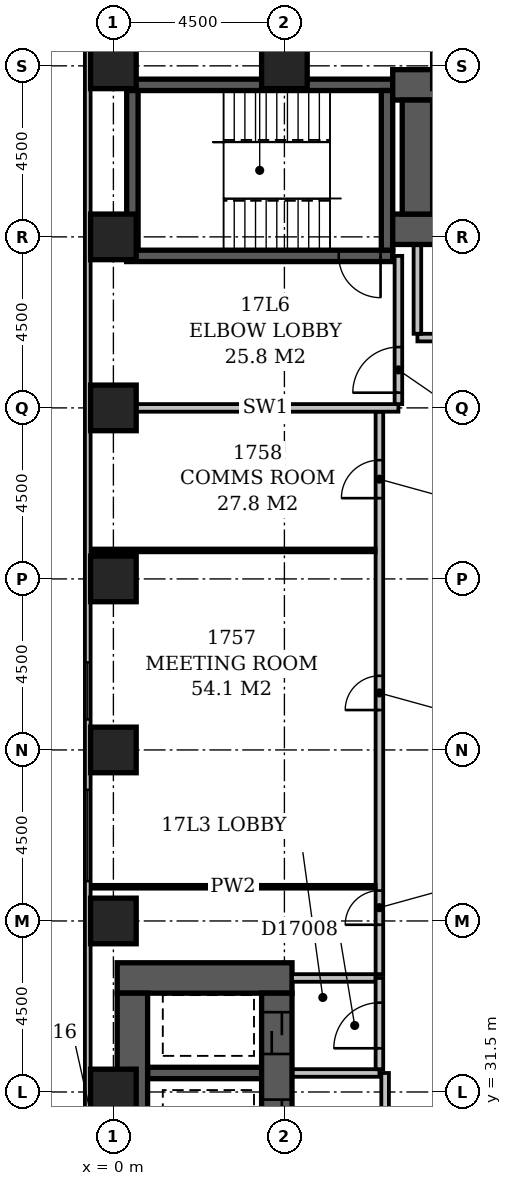
"""IFC4 building model, lengths in metres.
Left out: names, types, materials, properties, quantities, classifications, styles, units other than length and angle.
Written with IfcOpenShell. Run it as: python <this file> out.ifc"""

import sys

from ifc_helpers import new_model, si_unit, direction, frame, frame_2d, origin, origin_2d, place, context, subcontext, project, spatial, rectangle, extrude, element, fill, save


model = new_model("IFC4")
c1 = context("Model", 3, precision=1e-05, world=origin(), true_north=direction((0.0, 1.0)))
c2 = subcontext(c1, "Body", "Model", "MODEL_VIEW")
j1 = project(units=[si_unit("LENGTHUNIT", "METRE"), si_unit("PLANEANGLEUNIT", "RADIAN")], contexts=[c1])
p1 = place(None, origin())
s1 = spatial("IfcSite", under=j1, at=p1, CompositionType="ELEMENT")
p2 = place(p1, origin())
s2 = spatial("IfcBuilding", under=s1, at=p2, CompositionType="ELEMENT")
p3 = place(p2, frame((0.0, 0.0, 72.2)))
s3 = spatial("IfcBuildingStorey", under=s2, at=p3, CompositionType="ELEMENT", Elevation=72.2)
p4 = place(p3, frame((0.1, 34.5, -0.3), z_axis=(0.0, 0.0, 1.0), x_axis=(1.0, 0.0, 0.0)))
e1 = element("IfcWall", 1, at=p4, inside=s3, PredefinedType="SHEAR", context=c2, shape_type="SweptSolid", body=[
    extrude(rectangle(XDim=4.6, YDim=0.8, at=frame_2d((2.3, 0.0))), origin(), (0.0, 0.0, 1.0), 3.6),
])
p5 = place(p3, frame((0.35, 53.5, -0.3), z_axis=(0.0, 0.0, 1.0), x_axis=(1.0, 0.0, 0.0)))
e2 = element("IfcWall", 2, at=p5, inside=s3, PredefinedType="SHEAR", context=c2, shape_type="SweptSolid", body=[
    extrude(rectangle(XDim=7.0, YDim=0.3, at=frame_2d((3.5, 0.0))), origin(), (0.0, 0.0, 1.0), 3.6),
])
p6 = place(p5, frame((5.58, 0.0, 0.3)))
e3 = element("IfcOpeningElement", 3, at=p6, cuts=e2, PredefinedType="OPENING", context=c2, shape_type="SweptSolid", body=[
    extrude(rectangle(XDim=1.1, YDim=2.1, at=frame_2d((0.55, 1.05))), frame((0.0, 0.162, 0.0), z_axis=(0.0, -1.0, 0.0), x_axis=(1.0, 0.0, 0.0)), (0.0, 0.0, 1.0), 0.324),
])
p7 = place(p3, frame((0.35, 58.0, -0.3), z_axis=(0.0, 0.0, 1.0), x_axis=(1.0, 0.0, 0.0)))
e4 = element("IfcWall", 4, at=p7, inside=s3, PredefinedType="SHEAR", context=c2, shape_type="SweptSolid", body=[
    extrude(rectangle(XDim=7.0, YDim=0.3, at=frame_2d((3.5, 0.0))), origin(), (0.0, 0.0, 1.0), 3.6),
])
p8 = place(p3, frame((0.5, 27.15, -0.3), z_axis=(0.0, 0.0, 1.0), x_axis=(0.0, 1.0, 0.0)))
e5 = element("IfcWall", 5, at=p8, inside=s3, PredefinedType="SHEAR", context=c2, shape_type="SweptSolid", body=[
    extrude(rectangle(XDim=6.95, YDim=0.8, at=frame_2d((3.475, 0.0))), origin(), (0.0, 0.0, 1.0), 3.6),
])
p9 = place(p3, frame((0.5, 53.65, -0.3), z_axis=(0.0, 0.0, 1.0), x_axis=(0.0, 1.0, 0.0)))
e6 = element("IfcWall", 6, at=p9, inside=s3, PredefinedType="SHEAR", context=c2, shape_type="SweptSolid", body=[
    extrude(rectangle(XDim=4.2, YDim=0.3, at=frame_2d((2.1, 0.0))), origin(), (0.0, 0.0, 1.0), 3.6),
])
p10 = place(p3, frame((0.9, 32.0, -0.3), z_axis=(0.0, 0.0, 1.0), x_axis=(1.0, 0.0, 0.0)))
e7 = element("IfcWall", 7, at=p10, inside=s3, PredefinedType="SHEAR", context=c2, shape_type="SweptSolid", body=[
    extrude(rectangle(XDim=3.0, YDim=0.3, at=frame_2d((1.5, 0.0))), origin(), (0.0, 0.0, 1.0), 3.6),
])
p11 = place(p3, frame((4.3, 27.15, -0.3), z_axis=(0.0, 0.0, 1.0), x_axis=(0.0, 1.0, 0.0)))
e8 = element("IfcWall", 8, at=p11, inside=s3, PredefinedType="SHEAR", context=c2, shape_type="SweptSolid", body=[
    extrude(rectangle(XDim=6.95, YDim=0.8, at=frame_2d((3.475, 0.0))), origin(), (0.0, 0.0, 1.0), 3.6),
])
p12 = place(p11, frame((3.05, 0.0, 0.3)))
e9 = element("IfcOpeningElement", 9, at=p12, cuts=e8, PredefinedType="OPENING", context=c2, shape_type="SweptSolid", body=[
    extrude(rectangle(XDim=1.1, YDim=2.1, at=frame_2d((0.55, 1.05))), frame((0.0, 0.412, 0.0), z_axis=(0.0, -1.0, 0.0), x_axis=(1.0, 0.0, 0.0)), (0.0, 0.0, 1.0), 0.824),
])
p13 = place(p11, frame((0.55, 0.0, 0.3)))
e10 = element("IfcOpeningElement", 10, at=p13, cuts=e8, PredefinedType="OPENING", context=c2, shape_type="SweptSolid", body=[
    extrude(rectangle(XDim=1.1, YDim=2.1, at=frame_2d((0.55, 1.05))), frame((0.0, 0.412, 0.0), z_axis=(0.0, -1.0, 0.0), x_axis=(1.0, 0.0, 0.0)), (0.0, 0.0, 1.0), 0.824),
])
p14 = place(p11, frame((5.35, 0.0, 0.3)))
e11 = element("IfcOpeningElement", 11, at=p14, cuts=e8, PredefinedType="OPENING", context=c2, shape_type="SweptSolid", body=[
    extrude(rectangle(XDim=1.1, YDim=2.1, at=frame_2d((0.55, 1.05))), frame((0.0, 0.412, 0.0), z_axis=(0.0, -1.0, 0.0), x_axis=(1.0, 0.0, 0.0)), (0.0, 0.0, 1.0), 0.824),
])
p15 = place(p3, frame((7.2, 53.65, -0.3), z_axis=(0.0, 0.0, 1.0), x_axis=(0.0, 1.0, 0.0)))
e12 = element("IfcWall", 12, at=p15, inside=s3, PredefinedType="SHEAR", context=c2, shape_type="SweptSolid", body=[
    extrude(rectangle(XDim=4.2, YDim=0.3, at=frame_2d((2.1, 0.0))), origin(), (0.0, 0.0, 1.0), 3.6),
])
p16 = place(p3, frame((7.35, 54.2, -0.3), z_axis=(0.0, 0.0, 1.0), x_axis=(1.0, 0.0, 0.0)))
e13 = element("IfcWall", 13, at=p16, inside=s3, PredefinedType="SHEAR", context=c2, shape_type="SweptSolid", body=[
    extrude(rectangle(XDim=16.45, YDim=0.8, at=frame_2d((8.225, 0.0))), origin(), (0.0, 0.0, 1.0), 3.6),
])
p17 = place(p16, frame((1.35, 0.0, 0.3)))
e14 = element("IfcOpeningElement", 14, at=p17, cuts=e13, PredefinedType="OPENING", context=c2, shape_type="SweptSolid", body=[
    extrude(rectangle(XDim=1.1, YDim=2.1, at=frame_2d((0.55, 1.05))), frame((0.0, 0.412, 0.0), z_axis=(0.0, -1.0, 0.0), x_axis=(1.0, 0.0, 0.0)), (0.0, 0.0, 1.0), 0.824),
])
p18 = place(p16, frame((3.85, 0.0, 0.3)))
e15 = element("IfcOpeningElement", 15, at=p18, cuts=e13, PredefinedType="OPENING", context=c2, shape_type="SweptSolid", body=[
    extrude(rectangle(XDim=1.1, YDim=2.1, at=frame_2d((0.55, 1.05))), frame((0.0, 0.412, 0.0), z_axis=(0.0, -1.0, 0.0), x_axis=(1.0, 0.0, 0.0)), (0.0, 0.0, 1.0), 0.824),
])
p19 = place(p16, frame((6.35, 0.0, 0.3)))
e16 = element("IfcOpeningElement", 16, at=p19, cuts=e13, PredefinedType="OPENING", context=c2, shape_type="SweptSolid", body=[
    extrude(rectangle(XDim=1.1, YDim=2.1, at=frame_2d((0.55, 1.05))), frame((0.0, 0.412, 0.0), z_axis=(0.0, -1.0, 0.0), x_axis=(1.0, 0.0, 0.0)), (0.0, 0.0, 1.0), 0.824),
])
p20 = place(p16, frame((8.85, 0.0, 0.3)))
e17 = element("IfcOpeningElement", 17, at=p20, cuts=e13, PredefinedType="OPENING", context=c2, shape_type="SweptSolid", body=[
    extrude(rectangle(XDim=1.1, YDim=2.1, at=frame_2d((0.55, 1.05))), frame((0.0, 0.412, 0.0), z_axis=(0.0, -1.0, 0.0), x_axis=(1.0, 0.0, 0.0)), (0.0, 0.0, 1.0), 0.824),
])
p21 = place(p16, frame((11.35, 0.0, 0.3)))
e18 = element("IfcOpeningElement", 18, at=p21, cuts=e13, PredefinedType="OPENING", context=c2, shape_type="SweptSolid", body=[
    extrude(rectangle(XDim=1.1, YDim=2.1, at=frame_2d((0.55, 1.05))), frame((0.0, 0.412, 0.0), z_axis=(0.0, -1.0, 0.0), x_axis=(1.0, 0.0, 0.0)), (0.0, 0.0, 1.0), 0.824),
])
p22 = place(p16, frame((13.85, 0.0, 0.3)))
e19 = element("IfcOpeningElement", 19, at=p22, cuts=e13, PredefinedType="OPENING", context=c2, shape_type="SweptSolid", body=[
    extrude(rectangle(XDim=1.1, YDim=2.1, at=frame_2d((0.55, 1.05))), frame((0.0, 0.412, 0.0), z_axis=(0.0, -1.0, 0.0), x_axis=(1.0, 0.0, 0.0)), (0.0, 0.0, 1.0), 0.824),
])
p23 = place(p3, frame((7.35, 58.0, -0.3), z_axis=(0.0, 0.0, 1.0), x_axis=(1.0, 0.0, 0.0)))
e20 = element("IfcWall", 20, at=p23, inside=s3, PredefinedType="SHEAR", context=c2, shape_type="SweptSolid", body=[
    extrude(rectangle(XDim=16.45, YDim=0.8, at=frame_2d((8.225, 0.0))), origin(), (0.0, 0.0, 1.0), 3.6),
])
p24 = place(p3, frame((8.0, 54.6, -0.3), z_axis=(0.0, 0.0, 1.0), x_axis=(0.0, 1.0, 0.0)))
e21 = element("IfcWall", 21, at=p24, inside=s3, PredefinedType="SHEAR", context=c2, shape_type="SweptSolid", body=[
    extrude(rectangle(XDim=3.0, YDim=0.8, at=frame_2d((1.5, 0.0))), origin(), (0.0, 0.0, 1.0), 3.6),
])
for number, where, z_axis, x_axis in (
    (22, (0.0, 31.5, -0.3), (0.0, 0.0, 1.0), (1.0, 0.0, 0.0)),
    (23, (0.0, 36.0, -0.3), (0.0, 0.0, 1.0), (1.0, 0.0, 0.0)),
    (24, (0.0, 40.5, -0.3), (0.0, 0.0, 1.0), (1.0, 0.0, 0.0)),
    (25, (0.0, 45.0, -0.3), (0.0, 0.0, 1.0), (1.0, 0.0, 0.0)),
    (26, (0.0, 49.5, -0.3), (0.0, 0.0, 1.0), (1.0, 0.0, 0.0)),
    (27, (0.0, 54.0, -0.3), (0.0, 0.0, 1.0), (1.0, 0.0, 0.0)),
    (28, (0.0, 58.5, -0.3), (0.0, 0.0, 1.0), (1.0, 0.0, 0.0)),
    (29, (4.5, 58.5, -0.3), (0.0, 0.0, 1.0), (1.0, 0.0, 0.0)),
):
    element("IfcColumn", number, at=place(p3, frame(where, z_axis=z_axis, x_axis=x_axis)), inside=s3, PredefinedType="COLUMN", context=c2, shape_type="SweptSolid", body=[
        extrude(rectangle(XDim=1.2, YDim=1.2, at=origin_2d()), origin(), (0.0, 0.0, 1.0), 3.6),
    ])
p25 = place(p3, frame((-0.675, 59.1, 0.0), z_axis=(0.0, 0.0, 1.0), x_axis=(0.0, -1.0, 0.0)))
e30 = element("IfcWall", 30, at=p25, inside=s3, PredefinedType="STANDARD", context=c2, shape_type="SweptSolid", body=[
    extrude(rectangle(XDim=55.35, YDim=0.15, at=frame_2d((27.675, 0.0))), origin(), (0.0, 0.0, 1.0), 2.7),
])
p26 = place(p25, frame((16.297, 0.0, 0.6)))
e31 = element("IfcOpeningElement", 31, at=p26, cuts=e30, PredefinedType="OPENING", context=c2, shape_type="SweptSolid", body=[
    extrude(rectangle(XDim=1.5, YDim=1.8, at=frame_2d((0.75, 0.9))), frame((0.0, 0.087, 0.0), z_axis=(0.0, -1.0, 0.0), x_axis=(1.0, 0.0, 0.0)), (0.0, 0.0, 1.0), 0.174),
])
p27 = place(p25, frame((19.65, 0.0, 0.6)))
e32 = element("IfcOpeningElement", 32, at=p27, cuts=e30, PredefinedType="OPENING", context=c2, shape_type="SweptSolid", body=[
    extrude(rectangle(XDim=2.4, YDim=1.8, at=frame_2d((1.2, 0.9))), frame((0.0, 0.087, 0.0), z_axis=(0.0, -1.0, 0.0), x_axis=(1.0, 0.0, 0.0)), (0.0, 0.0, 1.0), 0.174),
])
p28 = place(p25, frame((43.297, 0.0, 0.6)))
e33 = element("IfcOpeningElement", 33, at=p28, cuts=e30, PredefinedType="OPENING", context=c2, shape_type="SweptSolid", body=[
    extrude(rectangle(XDim=1.5, YDim=1.8, at=frame_2d((0.75, 0.9))), frame((0.0, 0.087, 0.0), z_axis=(0.0, -1.0, 0.0), x_axis=(1.0, 0.0, 0.0)), (0.0, 0.0, 1.0), 0.174),
])
p29 = place(p3, frame((8.0, 51.35, 0.0), z_axis=(0.0, 0.0, 1.0), x_axis=(1.0, 0.0, 0.0)))
e34 = element("IfcWall", 34, at=p29, inside=s3, PredefinedType="PARTITIONING", context=c2, shape_type="SweptSolid", body=[
    extrude(rectangle(XDim=15.0, YDim=0.2, at=frame_2d((7.5, 0.0))), origin(), (0.0, 0.0, 1.0), 3.3),
])
p30 = place(p29, frame((3.4, 0.0, 0.0)))
e35 = element("IfcOpeningElement", 35, at=p30, cuts=e34, PredefinedType="OPENING", context=c2, shape_type="SweptSolid", body=[
    extrude(rectangle(XDim=1.2, YDim=2.1, at=frame_2d((0.6, 1.05))), frame((0.0, 0.112, 0.0), z_axis=(0.0, -1.0, 0.0), x_axis=(1.0, 0.0, 0.0)), (0.0, 0.0, 1.0), 0.224),
])
p31 = place(p29, frame((9.4, 0.0, 0.0)))
e36 = element("IfcOpeningElement", 36, at=p31, cuts=e34, PredefinedType="OPENING", context=c2, shape_type="SweptSolid", body=[
    extrude(rectangle(XDim=1.2, YDim=2.1, at=frame_2d((0.6, 1.05))), frame((0.0, 0.112, 0.0), z_axis=(0.0, -1.0, 0.0), x_axis=(1.0, 0.0, 0.0)), (0.0, 0.0, 1.0), 0.224),
])
p32 = place(p3, frame((8.0, 51.45, 0.0), z_axis=(0.0, 0.0, 1.0), x_axis=(0.0, 1.0, 0.0)))
e37 = element("IfcWall", 37, at=p32, inside=s3, PredefinedType="PARTITIONING", context=c2, shape_type="SweptSolid", body=[
    extrude(rectangle(XDim=2.33, YDim=0.2, at=frame_2d((1.165, 0.0))), origin(), (0.0, 0.0, 1.0), 3.3),
])
p33 = place(p3, frame((4.72, 32.0, 0.0), z_axis=(0.0, 0.0, 1.0), x_axis=(1.0, 0.0, 0.0)))
e38 = element("IfcWall", 38, at=p33, inside=s3, PredefinedType="PARTITIONING", context=c2, shape_type="SweptSolid", body=[
    extrude(rectangle(XDim=2.28, YDim=0.2, at=frame_2d((1.14, 0.0))), origin(), (0.0, 0.0, 1.0), 3.3),
])
p34 = place(p3, frame((7.0, 32.1, 0.0), z_axis=(0.0, 0.0, 1.0), x_axis=(0.0, 1.0, 0.0)))
e39 = element("IfcWall", 39, at=p34, inside=s3, PredefinedType="PARTITIONING", context=c2, shape_type="SweptSolid", body=[
    extrude(rectangle(XDim=2.4, YDim=0.2, at=frame_2d((1.2, 0.0))), origin(), (0.0, 0.0, 1.0), 3.3),
])
p35 = place(p34, frame((0.55, 0.0, 0.0)))
e40 = element("IfcOpeningElement", 40, at=p35, cuts=e39, PredefinedType="OPENING", context=c2, shape_type="SweptSolid", body=[
    extrude(rectangle(XDim=1.2, YDim=2.1, at=frame_2d((0.6, 1.05))), frame((0.0, 0.112, 0.0), z_axis=(0.0, -1.0, 0.0), x_axis=(1.0, 0.0, 0.0)), (0.0, 0.0, 1.0), 0.224),
])
p36 = place(p3, frame((4.7, 34.5, 0.0), z_axis=(0.0, 0.0, 1.0), x_axis=(1.0, 0.0, 0.0)))
e41 = element("IfcWall", 41, at=p36, inside=s3, PredefinedType="PARTITIONING", context=c2, shape_type="SweptSolid", body=[
    extrude(rectangle(XDim=2.2, YDim=0.2, at=frame_2d((1.1, 0.0))), origin(), (0.0, 0.0, 1.0), 3.3),
])
p37 = place(p3, frame((7.15, 27.17, 0.0), z_axis=(0.0, 0.0, 1.0), x_axis=(0.0, 1.0, 0.0)))
e42 = element("IfcWall", 42, at=p37, inside=s3, PredefinedType="PARTITIONING", context=c2, shape_type="SweptSolid", body=[
    extrude(rectangle(XDim=4.83, YDim=0.2, at=frame_2d((2.415, 0.0))), origin(), (0.0, 0.0, 1.0), 3.3),
])
p38 = place(p37, frame((1.73, 0.0, 0.0)))
e43 = element("IfcOpeningElement", 43, at=p38, cuts=e42, PredefinedType="OPENING", context=c2, shape_type="SweptSolid", body=[
    extrude(rectangle(XDim=1.2, YDim=2.1, at=frame_2d((0.6, 1.05))), frame((0.0, 0.112, 0.0), z_axis=(0.0, -1.0, 0.0), x_axis=(1.0, 0.0, 0.0)), (0.0, 0.0, 1.0), 0.224),
])
p39 = place(p3, frame((0.5, 49.5, 0.0), z_axis=(0.0, 0.0, 1.0), x_axis=(1.0, 0.0, 0.0)))
e44 = element("IfcWall", 44, at=p39, inside=s3, PredefinedType="PARTITIONING", context=c2, shape_type="SweptSolid", body=[
    extrude(rectangle(XDim=7.0, YDim=0.2, at=frame_2d((3.5, 0.0))), origin(), (0.0, 0.0, 1.0), 3.3),
])
p40 = place(p3, frame((7.5, 49.6, 0.0), z_axis=(0.0, 0.0, 1.0), x_axis=(0.0, 1.0, 0.0)))
e45 = element("IfcWall", 45, at=p40, inside=s3, PredefinedType="PARTITIONING", context=c2, shape_type="SweptSolid", body=[
    extrude(rectangle(XDim=3.9, YDim=0.2, at=frame_2d((1.95, 0.0))), origin(), (0.0, 0.0, 1.0), 3.3),
])
p41 = place(p40, frame((0.3, 0.0, 0.0)))
e46 = element("IfcOpeningElement", 46, at=p41, cuts=e45, PredefinedType="OPENING", context=c2, shape_type="SweptSolid", body=[
    extrude(rectangle(XDim=1.2, YDim=2.1, at=frame_2d((0.6, 1.05))), frame((0.0, 0.112, 0.0), z_axis=(0.0, -1.0, 0.0), x_axis=(1.0, 0.0, 0.0)), (0.0, 0.0, 1.0), 0.224),
])
p42 = place(p3, frame((7.0, 34.6, 0.0), z_axis=(0.0, 0.0, 1.0), x_axis=(0.0, 1.0, 0.0)))
e47 = element("IfcWall", 47, at=p42, inside=s3, PredefinedType="PARTITIONING", context=c2, shape_type="SweptSolid", body=[
    extrude(rectangle(XDim=14.8, YDim=0.2, at=frame_2d((7.4, 0.0))), origin(), (0.0, 0.0, 1.0), 3.3),
])
p43 = place(p42, frame((1.3, 0.0, 0.0)))
e48 = element("IfcOpeningElement", 48, at=p43, cuts=e47, PredefinedType="OPENING", context=c2, shape_type="SweptSolid", body=[
    extrude(rectangle(XDim=0.9, YDim=2.1, at=frame_2d((0.45, 1.05))), frame((0.0, 0.112, 0.0), z_axis=(0.0, -1.0, 0.0), x_axis=(1.0, 0.0, 0.0)), (0.0, 0.0, 1.0), 0.224),
])
p44 = place(p42, frame((6.95, 0.0, 0.0)))
e49 = element("IfcOpeningElement", 49, at=p44, cuts=e47, PredefinedType="OPENING", context=c2, shape_type="SweptSolid", body=[
    extrude(rectangle(XDim=0.9, YDim=2.1, at=frame_2d((0.45, 1.05))), frame((0.0, 0.112, 0.0), z_axis=(0.0, -1.0, 0.0), x_axis=(1.0, 0.0, 0.0)), (0.0, 0.0, 1.0), 0.224),
])
p45 = place(p42, frame((12.525, 0.0, 0.0)))
e50 = element("IfcOpeningElement", 50, at=p45, cuts=e47, PredefinedType="OPENING", context=c2, shape_type="SweptSolid", body=[
    extrude(rectangle(XDim=1.0, YDim=2.1, at=frame_2d((0.5, 1.05))), frame((0.0, 0.112, 0.0), z_axis=(0.0, -1.0, 0.0), x_axis=(1.0, 0.0, 0.0)), (0.0, 0.0, 1.0), 0.224),
])
for number, where, z_axis, x_axis in (
    (51, (-0.6, 36.9, 0.0), (0.0, 0.0, 1.0), (1.0, 0.0, 0.0)),
    (52, (-0.6, 45.75, 0.0), (0.0, 0.0, 1.0), (1.0, 0.0, 0.0)),
):
    element("IfcWall", number, at=place(p3, frame(where, z_axis=z_axis, x_axis=x_axis)), inside=s3, PredefinedType="PARTITIONING", context=c2, shape_type="SweptSolid", body=[
        extrude(rectangle(XDim=7.5, YDim=0.1, at=frame_2d((3.75, 0.0))), origin(), (0.0, 0.0, 1.0), 3.3),
    ])
p46 = place(p26, origin())
e53 = element("IfcWindow", 53, at=p46, inside=s3, PartitioningType="SINGLE_PANEL", PredefinedType="WINDOW", context=c2, shape_type="SweptSolid", body=[
    extrude(rectangle(XDim=1.5, YDim=1.8, at=frame_2d((0.75, 0.9))), frame((0.0, 0.03, 0.0), z_axis=(0.0, -1.0, 0.0), x_axis=(1.0, 0.0, 0.0)), (0.0, 0.0, 1.0), 0.06),
])
fill(e31, e53)
p47 = place(p27, origin())
e54 = element("IfcWindow", 54, at=p47, inside=s3, PartitioningType="SINGLE_PANEL", PredefinedType="WINDOW", context=c2, shape_type="SweptSolid", body=[
    extrude(rectangle(XDim=2.4, YDim=1.8, at=frame_2d((1.2, 0.9))), frame((0.0, 0.03, 0.0), z_axis=(0.0, -1.0, 0.0), x_axis=(1.0, 0.0, 0.0)), (0.0, 0.0, 1.0), 0.06),
])
fill(e32, e54)
p48 = place(p41, origin())
e55 = element("IfcDoor", 55, at=p48, inside=s3, OperationType="SINGLE_SWING_LEFT", PredefinedType="DOOR", context=c2, shape_type="SweptSolid", body=[
    extrude(rectangle(XDim=1.2, YDim=2.1, at=frame_2d((0.6, 1.05))), frame((0.0, 0.025, 0.0), z_axis=(0.0, -1.0, 0.0), x_axis=(1.0, 0.0, 0.0)), (0.0, 0.0, 1.0), 0.05),
])
fill(e46, e55)
p49 = place(p12, origin())
e56 = element("IfcDoor", 56, at=p49, inside=s3, OperationType="SLIDING_TO_LEFT", PredefinedType="DOOR", context=c2, shape_type="SweptSolid", body=[
    extrude(rectangle(XDim=1.1, YDim=2.1, at=frame_2d((0.55, 1.05))), frame((0.0, 0.025, 0.0), z_axis=(0.0, -1.0, 0.0), x_axis=(1.0, 0.0, 0.0)), (0.0, 0.0, 1.0), 0.05),
])
fill(e9, e56)
p50 = place(p35, origin())
e57 = element("IfcDoor", 57, at=p50, inside=s3, OperationType="SINGLE_SWING_LEFT", PredefinedType="DOOR", context=c2, shape_type="SweptSolid", body=[
    extrude(rectangle(XDim=1.2, YDim=2.1, at=frame_2d((0.6, 1.05))), frame((0.0, 0.025, 0.0), z_axis=(0.0, -1.0, 0.0), x_axis=(1.0, 0.0, 0.0)), (0.0, 0.0, 1.0), 0.05),
])
fill(e40, e57)
p51 = place(p14, origin())
e58 = element("IfcDoor", 58, at=p51, inside=s3, OperationType="SLIDING_TO_LEFT", PredefinedType="DOOR", context=c2, shape_type="SweptSolid", body=[
    extrude(rectangle(XDim=1.1, YDim=2.1, at=frame_2d((0.55, 1.05))), frame((0.0, 0.025, 0.0), z_axis=(0.0, -1.0, 0.0), x_axis=(1.0, 0.0, 0.0)), (0.0, 0.0, 1.0), 0.05),
])
fill(e11, e58)
p52 = place(p6, origin())
e59 = element("IfcDoor", 59, at=p52, inside=s3, OperationType="SINGLE_SWING_RIGHT", PredefinedType="DOOR", context=c2, shape_type="SweptSolid", body=[
    extrude(rectangle(XDim=1.1, YDim=2.1, at=frame_2d((0.55, 1.05))), frame((0.0, 0.025, 0.0), z_axis=(0.0, -1.0, 0.0), x_axis=(1.0, 0.0, 0.0)), (0.0, 0.0, 1.0), 0.05),
])
fill(e3, e59)
p53 = place(p43, origin())
e60 = element("IfcDoor", 60, at=p53, inside=s3, OperationType="SINGLE_SWING_LEFT", PredefinedType="DOOR", context=c2, shape_type="SweptSolid", body=[
    extrude(rectangle(XDim=0.9, YDim=2.1, at=frame_2d((0.45, 1.05))), frame((0.0, 0.025, 0.0), z_axis=(0.0, -1.0, 0.0), x_axis=(1.0, 0.0, 0.0)), (0.0, 0.0, 1.0), 0.05),
])
fill(e48, e60)
p54 = place(p44, origin())
e61 = element("IfcDoor", 61, at=p54, inside=s3, OperationType="SINGLE_SWING_LEFT", PredefinedType="DOOR", context=c2, shape_type="SweptSolid", body=[
    extrude(rectangle(XDim=0.9, YDim=2.1, at=frame_2d((0.45, 1.05))), frame((0.0, 0.025, 0.0), z_axis=(0.0, -1.0, 0.0), x_axis=(1.0, 0.0, 0.0)), (0.0, 0.0, 1.0), 0.05),
])
fill(e49, e61)
p55 = place(p45, origin())
e62 = element("IfcDoor", 62, at=p55, inside=s3, OperationType="SINGLE_SWING_LEFT", PredefinedType="DOOR", context=c2, shape_type="SweptSolid", body=[
    extrude(rectangle(XDim=1.0, YDim=2.1, at=frame_2d((0.5, 1.05))), frame((0.0, 0.025, 0.0), z_axis=(0.0, -1.0, 0.0), x_axis=(1.0, 0.0, 0.0)), (0.0, 0.0, 1.0), 0.05),
])
fill(e50, e62)
save(model, sys.argv[1])
